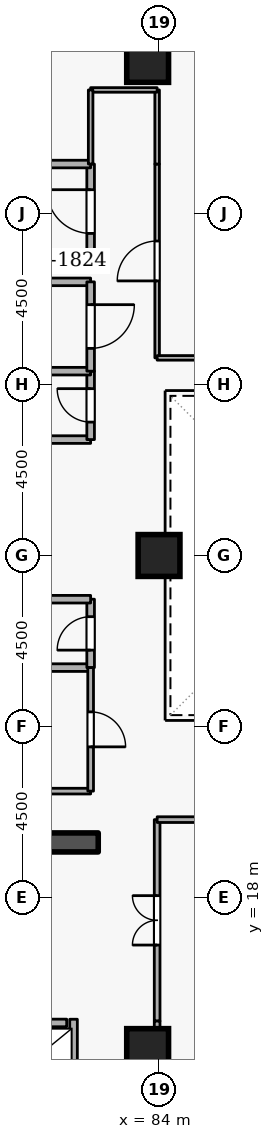
"""IFC4 building model, lengths in metres.
Left out: names, types, materials, properties, quantities, classifications, styles, units other than length and angle.
Written with IfcOpenShell. Run it as: python <this file> out.ifc"""

import sys

from ifc_helpers import new_model, si_unit, direction, frame, frame_2d, origin, origin_2d, place, context, subcontext, project, spatial, rectangle, extrude, element, fill, save


model = new_model("IFC4")
c1 = context("Model", 3, precision=1e-05, world=origin(), true_north=direction((0.0, 1.0)))
c2 = subcontext(c1, "Body", "Model", "MODEL_VIEW")
j1 = project(units=[si_unit("LENGTHUNIT", "METRE"), si_unit("PLANEANGLEUNIT", "RADIAN")], contexts=[c1])
p1 = place(None, origin())
s1 = spatial("IfcSite", under=j1, at=p1, CompositionType="ELEMENT")
p2 = place(p1, origin())
s2 = spatial("IfcBuilding", under=s1, at=p2, CompositionType="ELEMENT")
p3 = place(p2, frame((0.0, 0.0, 152.7)))
s3 = spatial("IfcBuildingStorey", under=s2, at=p3, CompositionType="ELEMENT", Elevation=152.7)
p4 = place(p3, frame((76.6, 19.45, 0.0), z_axis=(0.0, 0.0, 1.0), x_axis=(1.0, 0.0, 0.0)))
e1 = element("IfcWall", 1, at=p4, inside=s3, PredefinedType="SHEAR", context=c2, shape_type="SweptSolid", body=[
    extrude(rectangle(XDim=5.8, YDim=0.5, at=frame_2d((2.9, 0.0))), origin(), (0.0, 0.0, 1.0), 3.6),
])
for number, where, z_axis, x_axis in (
    (2, (83.7, 14.0, 0.0), (0.0, 0.0, 1.0), (1.0, 0.0, 0.0)),
    (3, (83.7, 40.0, 0.0), (0.0, 0.0, 1.0), (1.0, 0.0, 0.0)),
    (4, (84.0, 27.0, 0.0), (0.0, 0.0, 1.0), (1.0, 0.0, 0.0)),
):
    element("IfcColumn", number, at=place(p3, frame(where, z_axis=z_axis, x_axis=x_axis)), inside=s3, PredefinedType="COLUMN", context=c2, shape_type="SweptSolid", body=[
        extrude(rectangle(XDim=1.1, YDim=1.1, at=origin_2d()), origin(), (0.0, 0.0, 1.0), 3.6),
    ])
p5 = place(p3, frame((79.63, 14.7, 0.0), z_axis=(0.0, 0.0, 1.0), x_axis=(1.0, 0.0, 0.0)))
e5 = element("IfcWall", 5, at=p5, inside=s3, PredefinedType="STANDARD", context=c2, shape_type="SweptSolid", body=[
    extrude(rectangle(XDim=1.94, YDim=0.2, at=frame_2d((0.97, 0.0))), origin(), (0.0, 0.0, 1.0), 3.34),
])
p6 = place(p5, frame((0.46, 0.0, 0.0)))
e6 = element("IfcOpeningElement", 6, at=p6, cuts=e5, PredefinedType="OPENING", context=c2, shape_type="SweptSolid", body=[
    extrude(rectangle(XDim=1.02, YDim=2.06, at=frame_2d((0.51, 1.03))), frame((0.0, 0.11, 0.0), z_axis=(0.0, -1.0, 0.0), x_axis=(1.0, 0.0, 0.0)), (0.0, 0.0, 1.0), 0.22),
])
p7 = place(p3, frame((81.75, 12.612, 0.0), z_axis=(0.0, 0.0, 1.0), x_axis=(0.0, 1.0, 0.0)))
e7 = element("IfcWall", 7, at=p7, inside=s3, PredefinedType="STANDARD", context=c2, shape_type="SweptSolid", body=[
    extrude(rectangle(XDim=2.186, YDim=0.2, at=frame_2d((1.093, 0.0))), origin(), (0.0, 0.0, 1.0), 3.34),
])
p8 = place(p3, frame((79.9, 34.8, 0.0), z_axis=(0.0, 0.0, 1.0), x_axis=(1.0, 0.0, 0.0)))
e8 = element("IfcWall", 8, at=p8, inside=s3, PredefinedType="STANDARD", context=c2, shape_type="SweptSolid", body=[
    extrude(rectangle(XDim=2.3, YDim=0.2, at=frame_2d((1.15, 0.0))), origin(), (0.0, 0.0, 1.0), 2.545),
])
p9 = place(p3, frame((82.2, 34.8, 0.0), z_axis=(0.0, 0.0, 1.0), x_axis=(0.0, 1.0, 0.0)))
e9 = element("IfcWall", 9, at=p9, inside=s3, PredefinedType="STANDARD", context=c2, shape_type="SweptSolid", body=[
    extrude(rectangle(XDim=2.5, YDim=0.2, at=frame_2d((1.25, 0.0))), origin(), (0.0, 0.0, 1.0), 3.34),
])
p10 = place(p9, frame((0.675, 0.0, 0.0)))
e10 = element("IfcOpeningElement", 10, at=p10, cuts=e9, PredefinedType="OPENING", context=c2, shape_type="SweptSolid", body=[
    extrude(rectangle(XDim=1.15, YDim=2.1, at=frame_2d((0.575, 1.05))), frame((0.0, 0.11, 0.0), z_axis=(0.0, -1.0, 0.0), x_axis=(1.0, 0.0, 0.0)), (0.0, 0.0, 1.0), 0.22),
])
p11 = place(p3, frame((82.2, 37.3, 0.0), z_axis=(0.0, 0.0, 1.0), x_axis=(-1.0, 0.0, 0.0)))
e11 = element("IfcWall", 11, at=p11, inside=s3, PredefinedType="STANDARD", context=c2, shape_type="SweptSolid", body=[
    extrude(rectangle(XDim=5.7, YDim=0.2, at=frame_2d((2.85, 0.0))), origin(), (0.0, 0.0, 1.0), 3.34),
])
p12 = place(p3, frame((80.15, 24.05, 0.0), z_axis=(0.0, 0.0, 1.0), x_axis=(1.0, 0.0, 0.0)))
e12 = element("IfcWall", 12, at=p12, inside=s3, PredefinedType="STANDARD", context=c2, shape_type="SweptSolid", body=[
    extrude(rectangle(XDim=2.05, YDim=0.2, at=frame_2d((1.025, 0.0))), origin(), (0.0, 0.0, 1.0), 3.34),
])
p13 = place(p3, frame((82.2, 24.05, 0.0), z_axis=(0.0, 0.0, 1.0), x_axis=(0.0, 1.0, 0.0)))
e13 = element("IfcWall", 13, at=p13, inside=s3, PredefinedType="STANDARD", context=c2, shape_type="SweptSolid", body=[
    extrude(rectangle(XDim=1.8, YDim=0.2, at=frame_2d((0.9, 0.0))), origin(), (0.0, 0.0, 1.0), 3.34),
])
p14 = place(p13, frame((0.46, 0.0, 0.0)))
e14 = element("IfcOpeningElement", 14, at=p14, cuts=e13, PredefinedType="OPENING", context=c2, shape_type="SweptSolid", body=[
    extrude(rectangle(XDim=0.88, YDim=2.04, at=frame_2d((0.44, 1.02))), frame((0.0, 0.11, 0.0), z_axis=(0.0, -1.0, 0.0), x_axis=(1.0, 0.0, 0.0)), (0.0, 0.0, 1.0), 0.22),
])
for number, where, z_axis, x_axis in (
    (15, (82.2, 25.85, 0.0), (0.0, 0.0, 1.0), (-1.0, 0.0, 0.0)),
    (16, (80.15, 30.05, 0.0), (0.0, 0.0, 1.0), (1.0, 0.0, 0.0)),
):
    element("IfcWall", number, at=place(p3, frame(where, z_axis=z_axis, x_axis=x_axis)), inside=s3, PredefinedType="STANDARD", context=c2, shape_type="SweptSolid", body=[
        extrude(rectangle(XDim=2.05, YDim=0.2, at=frame_2d((1.025, 0.0))), origin(), (0.0, 0.0, 1.0), 3.34),
    ])
p15 = place(p3, frame((82.2, 30.05, 0.0), z_axis=(0.0, 0.0, 1.0), x_axis=(0.0, 1.0, 0.0)))
e17 = element("IfcWall", 17, at=p15, inside=s3, PredefinedType="STANDARD", context=c2, shape_type="SweptSolid", body=[
    extrude(rectangle(XDim=1.8, YDim=0.2, at=frame_2d((0.9, 0.0))), origin(), (0.0, 0.0, 1.0), 3.34),
])
p16 = place(p15, frame((0.46, 0.0, 0.0)))
e18 = element("IfcOpeningElement", 18, at=p16, cuts=e17, PredefinedType="OPENING", context=c2, shape_type="SweptSolid", body=[
    extrude(rectangle(XDim=0.88, YDim=2.04, at=frame_2d((0.44, 1.02))), frame((0.0, 0.11, 0.0), z_axis=(0.0, -1.0, 0.0), x_axis=(1.0, 0.0, 0.0)), (0.0, 0.0, 1.0), 0.22),
])
p17 = place(p3, frame((82.2, 31.85, 0.0), z_axis=(0.0, 0.0, 1.0), x_axis=(-1.0, 0.0, 0.0)))
e19 = element("IfcWall", 19, at=p17, inside=s3, PredefinedType="STANDARD", context=c2, shape_type="SweptSolid", body=[
    extrude(rectangle(XDim=2.05, YDim=0.2, at=frame_2d((1.025, 0.0))), origin(), (0.0, 0.0, 1.0), 3.34),
])
p18 = place(p3, frame((80.15, 34.2, 0.0), z_axis=(0.0, 0.0, 1.0), x_axis=(1.0, 0.0, 0.0)))
e20 = element("IfcWall", 20, at=p18, inside=s3, PredefinedType="STANDARD", context=c2, shape_type="SweptSolid", body=[
    extrude(rectangle(XDim=2.05, YDim=0.2, at=frame_2d((1.025, 0.0))), origin(), (0.0, 0.0, 1.0), 2.545),
])
p19 = place(p3, frame((82.2, 34.2, 0.0), z_axis=(0.0, 0.0, 1.0), x_axis=(0.0, -1.0, 0.0)))
e21 = element("IfcWall", 21, at=p19, inside=s3, PredefinedType="STANDARD", context=c2, shape_type="SweptSolid", body=[
    extrude(rectangle(XDim=2.35, YDim=0.2, at=frame_2d((1.175, 0.0))), origin(), (0.0, 0.0, 1.0), 3.34),
])
p20 = place(p19, frame((0.6, 0.0, 0.0)))
e22 = element("IfcOpeningElement", 22, at=p20, cuts=e21, PredefinedType="OPENING", context=c2, shape_type="SweptSolid", body=[
    extrude(rectangle(XDim=1.15, YDim=2.1, at=frame_2d((0.575, 1.05))), frame((0.0, 0.11, 0.0), z_axis=(0.0, -1.0, 0.0), x_axis=(1.0, 0.0, 0.0)), (0.0, 0.0, 1.0), 0.22),
])
p21 = place(p3, frame((82.2, 20.8, 0.0), z_axis=(0.0, 0.0, 1.0), x_axis=(-1.0, 0.0, 0.0)))
e23 = element("IfcWall", 23, at=p21, inside=s3, PredefinedType="PARTITIONING", context=c2, shape_type="SweptSolid", body=[
    extrude(rectangle(XDim=2.05, YDim=0.15, at=frame_2d((1.025, 0.0))), origin(), (0.0, 0.0, 1.0), 3.34),
])
p22 = place(p3, frame((82.2, 24.05, 0.0), z_axis=(0.0, 0.0, 1.0), x_axis=(0.0, -1.0, 0.0)))
e24 = element("IfcWall", 24, at=p22, inside=s3, PredefinedType="PARTITIONING", context=c2, shape_type="SweptSolid", body=[
    extrude(rectangle(XDim=3.25, YDim=0.15, at=frame_2d((1.625, 0.0))), origin(), (0.0, 0.0, 1.0), 3.34),
])
p23 = place(p22, frame((1.165, 0.0, 0.0)))
e25 = element("IfcOpeningElement", 25, at=p23, cuts=e24, PredefinedType="OPENING", context=c2, shape_type="SweptSolid", body=[
    extrude(rectangle(XDim=0.92, YDim=2.08, at=frame_2d((0.46, 1.04))), frame((0.0, 0.085, 0.0), z_axis=(0.0, -1.0, 0.0), x_axis=(1.0, 0.0, 0.0)), (0.0, 0.0, 1.0), 0.17),
])
p24 = place(p3, frame((83.95, 14.75, 0.0), z_axis=(0.0, 0.0, 1.0), x_axis=(0.0, 1.0, 0.0)))
e26 = element("IfcWall", 26, at=p24, inside=s3, PredefinedType="PARTITIONING", context=c2, shape_type="SweptSolid", body=[
    extrude(rectangle(XDim=5.3, YDim=0.15, at=frame_2d((2.65, 0.0))), origin(), (0.0, 0.0, 1.0), 3.34),
])
p25 = place(p24, frame((2.0, 0.0, 0.0)))
e27 = element("IfcOpeningElement", 27, at=p25, cuts=e26, PredefinedType="OPENING", context=c2, shape_type="SweptSolid", body=[
    extrude(rectangle(XDim=1.3, YDim=2.12, at=frame_2d((0.65, 1.06))), frame((0.0, 0.085, 0.0), z_axis=(0.0, -1.0, 0.0), x_axis=(1.0, 0.0, 0.0)), (0.0, 0.0, 1.0), 0.17),
])
p26 = place(p3, frame((83.95, 20.05, 0.0), z_axis=(0.0, 0.0, 1.0), x_axis=(1.0, 0.0, 0.0)))
e28 = element("IfcWall", 28, at=p26, inside=s3, PredefinedType="PARTITIONING", context=c2, shape_type="SweptSolid", body=[
    extrude(rectangle(XDim=4.55, YDim=0.15, at=frame_2d((2.275, 0.0))), origin(), (0.0, 0.0, 1.0), 3.34),
])
p27 = place(p3, frame((83.95, 12.4, 0.0), z_axis=(0.0, 0.0, 1.0), x_axis=(0.0, 1.0, 0.0)))
e29 = element("IfcWall", 29, at=p27, inside=s3, PredefinedType="PARTITIONING", context=c2, shape_type="SweptSolid", body=[
    extrude(rectangle(XDim=2.35, YDim=0.15, at=frame_2d((1.175, 0.0))), origin(), (0.0, 0.0, 1.0), 3.34),
])
p28 = place(p3, frame((83.95, 32.2, 0.0), z_axis=(0.0, 0.0, 1.0), x_axis=(0.0, 1.0, 0.0)))
e30 = element("IfcWall", 30, at=p28, inside=s3, PredefinedType="PARTITIONING", context=c2, shape_type="SweptSolid", body=[
    extrude(rectangle(XDim=5.1, YDim=0.12, at=frame_2d((2.55, 0.0))), origin(), (0.0, 0.0, 1.0), 3.34),
])
p29 = place(p28, frame((2.025, 0.0, 0.0)))
e31 = element("IfcOpeningElement", 31, at=p29, cuts=e30, PredefinedType="OPENING", context=c2, shape_type="SweptSolid", body=[
    extrude(rectangle(XDim=1.05, YDim=2.1, at=frame_2d((0.525, 1.05))), frame((0.0, 0.07, 0.0), z_axis=(0.0, -1.0, 0.0), x_axis=(1.0, 0.0, 0.0)), (0.0, 0.0, 1.0), 0.14),
])
p30 = place(p3, frame((83.95, 37.3, 0.0), z_axis=(0.0, 0.0, 1.0), x_axis=(0.0, 1.0, 0.0)))
e32 = element("IfcWall", 32, at=p30, inside=s3, PredefinedType="PARTITIONING", context=c2, shape_type="SweptSolid", body=[
    extrude(rectangle(XDim=1.95, YDim=0.12, at=frame_2d((0.975, 0.0))), origin(), (0.0, 0.0, 1.0), 3.34),
])
p31 = place(p3, frame((83.95, 39.25, 0.0), z_axis=(0.0, 0.0, 1.0), x_axis=(-1.0, 0.0, 0.0)))
e33 = element("IfcWall", 33, at=p31, inside=s3, PredefinedType="PARTITIONING", context=c2, shape_type="SweptSolid", body=[
    extrude(rectangle(XDim=1.75, YDim=0.12, at=frame_2d((0.875, 0.0))), origin(), (0.0, 0.0, 1.0), 3.34),
])
p32 = place(p3, frame((82.2, 39.25, 0.0), z_axis=(0.0, 0.0, 1.0), x_axis=(0.0, -1.0, 0.0)))
e34 = element("IfcWall", 34, at=p32, inside=s3, PredefinedType="PARTITIONING", context=c2, shape_type="SweptSolid", body=[
    extrude(rectangle(XDim=1.95, YDim=0.12, at=frame_2d((0.975, 0.0))), origin(), (0.0, 0.0, 1.0), 3.34),
])
p33 = place(p3, frame((88.5, 32.2, 0.0), z_axis=(0.0, 0.0, 1.0), x_axis=(-1.0, 0.0, 0.0)))
e35 = element("IfcWall", 35, at=p33, inside=s3, PredefinedType="PARTITIONING", context=c2, shape_type="SweptSolid", body=[
    extrude(rectangle(XDim=4.55, YDim=0.12, at=frame_2d((2.275, 0.0))), origin(), (0.0, 0.0, 1.0), 3.34),
])
p34 = place(p10, origin())
e36 = element("IfcDoor", 36, at=p34, inside=s3, OperationType="SINGLE_SWING_RIGHT", PredefinedType="DOOR", context=c2, shape_type="SweptSolid", body=[
    extrude(rectangle(XDim=1.15, YDim=2.1, at=frame_2d((0.575, 1.05))), frame((0.0, 0.025, 0.0), z_axis=(0.0, -1.0, 0.0), x_axis=(1.0, 0.0, 0.0)), (0.0, 0.0, 1.0), 0.05),
])
fill(e10, e36)
p35 = place(p14, origin())
e37 = element("IfcDoor", 37, at=p35, inside=s3, OperationType="SINGLE_SWING_LEFT", PredefinedType="DOOR", context=c2, shape_type="SweptSolid", body=[
    extrude(rectangle(XDim=0.88, YDim=2.04, at=frame_2d((0.44, 1.02))), frame((0.0, 0.025, 0.0), z_axis=(0.0, -1.0, 0.0), x_axis=(1.0, 0.0, 0.0)), (0.0, 0.0, 1.0), 0.05),
])
fill(e14, e37)
p36 = place(p16, origin())
e38 = element("IfcDoor", 38, at=p36, inside=s3, OperationType="SINGLE_SWING_RIGHT", PredefinedType="DOOR", context=c2, shape_type="SweptSolid", body=[
    extrude(rectangle(XDim=0.88, YDim=2.04, at=frame_2d((0.44, 1.02))), frame((0.0, 0.025, 0.0), z_axis=(0.0, -1.0, 0.0), x_axis=(1.0, 0.0, 0.0)), (0.0, 0.0, 1.0), 0.05),
])
fill(e18, e38)
p37 = place(p23, origin())
e39 = element("IfcDoor", 39, at=p37, inside=s3, OperationType="SINGLE_SWING_RIGHT", PredefinedType="DOOR", context=c2, shape_type="SweptSolid", body=[
    extrude(rectangle(XDim=0.92, YDim=2.08, at=frame_2d((0.46, 1.04))), frame((0.0, 0.025, 0.0), z_axis=(0.0, -1.0, 0.0), x_axis=(1.0, 0.0, 0.0)), (0.0, 0.0, 1.0), 0.05),
])
fill(e25, e39)
p38 = place(p20, origin())
e40 = element("IfcDoor", 40, at=p38, inside=s3, OperationType="SINGLE_SWING_LEFT", PredefinedType="DOOR", context=c2, shape_type="SweptSolid", body=[
    extrude(rectangle(XDim=1.15, YDim=2.1, at=frame_2d((0.575, 1.05))), frame((0.0, 0.025, 0.0), z_axis=(0.0, -1.0, 0.0), x_axis=(1.0, 0.0, 0.0)), (0.0, 0.0, 1.0), 0.05),
])
fill(e22, e40)
p39 = place(p25, origin())
e41 = element("IfcDoor", 41, at=p39, inside=s3, OperationType="DOUBLE_DOOR_SINGLE_SWING", PredefinedType="DOOR", context=c2, shape_type="SweptSolid", body=[
    extrude(rectangle(XDim=1.3, YDim=2.12, at=frame_2d((0.65, 1.06))), frame((0.0, 0.025, 0.0), z_axis=(0.0, -1.0, 0.0), x_axis=(1.0, 0.0, 0.0)), (0.0, 0.0, 1.0), 0.05),
])
fill(e27, e41)
p40 = place(p29, origin())
e42 = element("IfcDoor", 42, at=p40, inside=s3, OperationType="SINGLE_SWING_LEFT", PredefinedType="DOOR", context=c2, shape_type="SweptSolid", body=[
    extrude(rectangle(XDim=1.05, YDim=2.1, at=frame_2d((0.525, 1.05))), frame((0.0, 0.025, 0.0), z_axis=(0.0, -1.0, 0.0), x_axis=(1.0, 0.0, 0.0)), (0.0, 0.0, 1.0), 0.05),
])
fill(e31, e42)
save(model, sys.argv[1])
